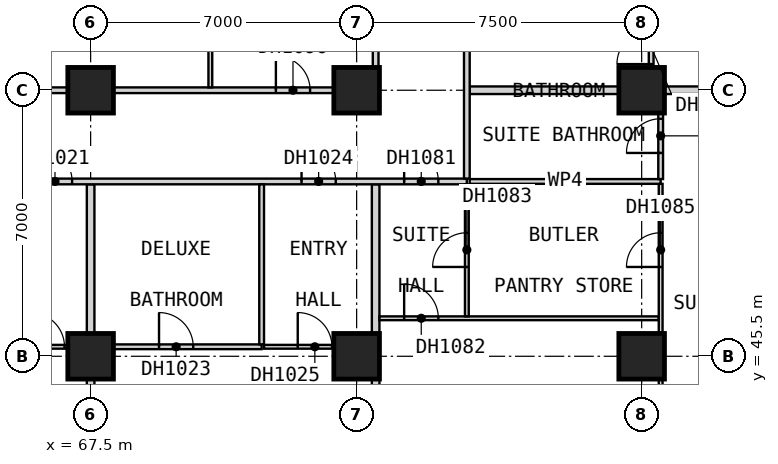
"""IFC4 building model, lengths in metres.
Left out: names, types, materials, properties, quantities, classifications, styles, units other than length and angle.
Written with IfcOpenShell. Run it as: python <this file> out.ifc"""

import sys

from ifc_helpers import new_model, si_unit, direction, frame, frame_2d, origin, origin_2d, place, context, subcontext, project, spatial, rectangle, extrude, element, fill, save


model = new_model("IFC4")
c1 = context("Model", 3, precision=1e-05, world=origin(), true_north=direction((0.0, 1.0)))
c2 = subcontext(c1, "Body", "Model", "MODEL_VIEW")
j1 = project(units=[si_unit("LENGTHUNIT", "METRE"), si_unit("PLANEANGLEUNIT", "RADIAN")], contexts=[c1])
p1 = place(None, origin())
s1 = spatial("IfcSite", under=j1, at=p1, CompositionType="ELEMENT")
p2 = place(p1, origin())
s2 = spatial("IfcBuilding", under=s1, at=p2, CompositionType="ELEMENT")
p3 = place(p2, frame((0.0, 0.0, 34.0)))
s3 = spatial("IfcBuildingStorey", under=s2, at=p3, CompositionType="ELEMENT", Elevation=34.0)
for number, where, z_axis, x_axis in (
    (1, (67.5, 45.5, 0.0), (0.0, 0.0, 1.0), (1.0, 0.0, 0.0)),
    (2, (67.5, 52.5, 0.0), (0.0, 0.0, 1.0), (1.0, 0.0, 0.0)),
    (3, (74.5, 45.5, 0.0), (0.0, 0.0, 1.0), (1.0, 0.0, 0.0)),
    (4, (74.5, 52.5, 0.0), (0.0, 0.0, 1.0), (1.0, 0.0, 0.0)),
    (5, (82.0, 45.5, 0.0), (0.0, 0.0, 1.0), (1.0, 0.0, 0.0)),
    (6, (82.0, 52.5, 0.0), (0.0, 0.0, 1.0), (1.0, 0.0, 0.0)),
):
    element("IfcColumn", number, at=place(p3, frame(where, z_axis=z_axis, x_axis=x_axis)), inside=s3, PredefinedType="COLUMN", context=c2, shape_type="SweptSolid", body=[
        extrude(rectangle(XDim=1.2, YDim=1.2, at=origin_2d()), origin(), (0.0, 0.0, 1.0), 3.6),
    ])
for number, where, z_axis, x_axis in (
    (7, (77.475, 52.5, 0.0), (0.0, 0.0, 1.0), (1.0, 0.0, 0.0)),
    (8, (67.5, 37.5, 0.0), (0.0, 0.0, 1.0), (0.0, 1.0, 0.0)),
):
    element("IfcWall", number, at=place(p3, frame(where, z_axis=z_axis, x_axis=x_axis)), inside=s3, PredefinedType="PARTITIONING", context=c2, shape_type="SweptSolid", body=[
        extrude(rectangle(XDim=12.525, YDim=0.2, at=frame_2d((6.262, 0.0))), origin(), (0.0, 0.0, 1.0), 3.35),
    ])
p4 = place(p3, frame((75.0, 38.31, 0.0), z_axis=(0.0, 0.0, 1.0), x_axis=(0.0, 1.0, 0.0)))
e9 = element("IfcWall", 9, at=p4, inside=s3, PredefinedType="PARTITIONING", context=c2, shape_type="SweptSolid", body=[
    extrude(rectangle(XDim=11.715, YDim=0.2, at=frame_2d((5.857, 0.0))), origin(), (0.0, 0.0, 1.0), 3.35),
])
p5 = place(p3, frame((33.75, 50.1, 0.0), z_axis=(0.0, 0.0, 1.0), x_axis=(1.0, 0.0, 0.0)))
e10 = element("IfcWall", 10, at=p5, inside=s3, PredefinedType="PARTITIONING", context=c2, shape_type="SweptSolid", body=[
    extrude(rectangle(XDim=43.65, YDim=0.15, at=frame_2d((21.825, 0.0))), origin(), (0.0, 0.0, 1.0), 3.35),
])
p6 = place(p5, frame((5.175, 0.0, 0.0)))
e11 = element("IfcOpeningElement", 11, at=p6, cuts=e10, PredefinedType="OPENING", context=c2, shape_type="SweptSolid", body=[
    extrude(rectangle(XDim=0.9, YDim=2.1, at=frame_2d((0.45, 1.05))), frame((0.0, 0.085, 0.0), z_axis=(0.0, -1.0, 0.0), x_axis=(1.0, 0.0, 0.0)), (0.0, 0.0, 1.0), 0.17),
])
p7 = place(p5, frame((13.05, 0.0, 0.0)))
e12 = element("IfcOpeningElement", 12, at=p7, cuts=e10, PredefinedType="OPENING", context=c2, shape_type="SweptSolid", body=[
    extrude(rectangle(XDim=0.9, YDim=2.1, at=frame_2d((0.45, 1.05))), frame((0.0, 0.085, 0.0), z_axis=(0.0, -1.0, 0.0), x_axis=(1.0, 0.0, 0.0)), (0.0, 0.0, 1.0), 0.17),
])
p8 = place(p5, frame((17.363, 0.0, 0.0)))
e13 = element("IfcOpeningElement", 13, at=p8, cuts=e10, PredefinedType="OPENING", context=c2, shape_type="SweptSolid", body=[
    extrude(rectangle(XDim=0.9, YDim=2.1, at=frame_2d((0.45, 1.05))), frame((0.0, 0.085, 0.0), z_axis=(0.0, -1.0, 0.0), x_axis=(1.0, 0.0, 0.0)), (0.0, 0.0, 1.0), 0.17),
])
p9 = place(p5, frame((21.113, 0.0, 0.0)))
e14 = element("IfcOpeningElement", 14, at=p9, cuts=e10, PredefinedType="OPENING", context=c2, shape_type="SweptSolid", body=[
    extrude(rectangle(XDim=0.9, YDim=2.1, at=frame_2d((0.45, 1.05))), frame((0.0, 0.085, 0.0), z_axis=(0.0, -1.0, 0.0), x_axis=(1.0, 0.0, 0.0)), (0.0, 0.0, 1.0), 0.17),
])
p10 = place(p5, frame((24.863, 0.0, 0.0)))
e15 = element("IfcOpeningElement", 15, at=p10, cuts=e10, PredefinedType="OPENING", context=c2, shape_type="SweptSolid", body=[
    extrude(rectangle(XDim=0.9, YDim=2.1, at=frame_2d((0.45, 1.05))), frame((0.0, 0.085, 0.0), z_axis=(0.0, -1.0, 0.0), x_axis=(1.0, 0.0, 0.0)), (0.0, 0.0, 1.0), 0.17),
])
p11 = place(p5, frame((28.613, 0.0, 0.0)))
e16 = element("IfcOpeningElement", 16, at=p11, cuts=e10, PredefinedType="OPENING", context=c2, shape_type="SweptSolid", body=[
    extrude(rectangle(XDim=0.9, YDim=2.1, at=frame_2d((0.45, 1.05))), frame((0.0, 0.085, 0.0), z_axis=(0.0, -1.0, 0.0), x_axis=(1.0, 0.0, 0.0)), (0.0, 0.0, 1.0), 0.17),
])
p12 = place(p5, frame((32.363, 0.0, 0.0)))
e17 = element("IfcOpeningElement", 17, at=p12, cuts=e10, PredefinedType="OPENING", context=c2, shape_type="SweptSolid", body=[
    extrude(rectangle(XDim=0.9, YDim=2.1, at=frame_2d((0.45, 1.05))), frame((0.0, 0.085, 0.0), z_axis=(0.0, -1.0, 0.0), x_axis=(1.0, 0.0, 0.0)), (0.0, 0.0, 1.0), 0.17),
])
p13 = place(p5, frame((39.3, 0.0, 0.0)))
e18 = element("IfcOpeningElement", 18, at=p13, cuts=e10, PredefinedType="OPENING", context=c2, shape_type="SweptSolid", body=[
    extrude(rectangle(XDim=0.9, YDim=2.1, at=frame_2d((0.45, 1.05))), frame((0.0, 0.085, 0.0), z_axis=(0.0, -1.0, 0.0), x_axis=(1.0, 0.0, 0.0)), (0.0, 0.0, 1.0), 0.17),
])
p14 = place(p5, frame((42.0, 0.0, 0.0)))
e19 = element("IfcOpeningElement", 19, at=p14, cuts=e10, PredefinedType="OPENING", context=c2, shape_type="SweptSolid", body=[
    extrude(rectangle(XDim=0.9, YDim=2.1, at=frame_2d((0.45, 1.05))), frame((0.0, 0.085, 0.0), z_axis=(0.0, -1.0, 0.0), x_axis=(1.0, 0.0, 0.0)), (0.0, 0.0, 1.0), 0.17),
])
p15 = place(p3, frame((60.0, 52.5, 0.0), z_axis=(0.0, 0.0, 1.0), x_axis=(1.0, 0.0, 0.0)))
e20 = element("IfcWall", 20, at=p15, inside=s3, PredefinedType="PARTITIONING", context=c2, shape_type="SweptSolid", body=[
    extrude(rectangle(XDim=15.0, YDim=0.15, at=frame_2d((7.5, 0.0))), origin(), (0.0, 0.0, 1.0), 3.35),
])
p16 = place(p15, frame((4.875, 0.0, 0.0)))
e21 = element("IfcOpeningElement", 21, at=p16, cuts=e20, PredefinedType="OPENING", context=c2, shape_type="SweptSolid", body=[
    extrude(rectangle(XDim=0.9, YDim=2.1, at=frame_2d((0.45, 1.05))), frame((0.0, 0.085, 0.0), z_axis=(0.0, -1.0, 0.0), x_axis=(1.0, 0.0, 0.0)), (0.0, 0.0, 1.0), 0.17),
])
p17 = place(p15, frame((12.375, 0.0, 0.0)))
e22 = element("IfcOpeningElement", 22, at=p17, cuts=e20, PredefinedType="OPENING", context=c2, shape_type="SweptSolid", body=[
    extrude(rectangle(XDim=0.9, YDim=2.1, at=frame_2d((0.45, 1.05))), frame((0.0, 0.085, 0.0), z_axis=(0.0, -1.0, 0.0), x_axis=(1.0, 0.0, 0.0)), (0.0, 0.0, 1.0), 0.17),
])
p18 = place(p3, frame((75.0, 52.575, 0.0), z_axis=(0.0, 0.0, 1.0), x_axis=(0.0, 1.0, 0.0)))
e23 = element("IfcWall", 23, at=p18, inside=s3, PredefinedType="PARTITIONING", context=c2, shape_type="SweptSolid", body=[
    extrude(rectangle(XDim=11.85, YDim=0.15, at=frame_2d((5.925, 0.0))), origin(), (0.0, 0.0, 1.0), 3.35),
])
p19 = place(p18, frame((9.225, 0.0, 0.0)))
e24 = element("IfcOpeningElement", 24, at=p19, cuts=e23, PredefinedType="OPENING", context=c2, shape_type="SweptSolid", body=[
    extrude(rectangle(XDim=0.9, YDim=2.1, at=frame_2d((0.45, 1.05))), frame((0.0, 0.085, 0.0), z_axis=(0.0, -1.0, 0.0), x_axis=(1.0, 0.0, 0.0)), (0.0, 0.0, 1.0), 0.17),
])
p20 = place(p3, frame((77.4, 50.175, 0.0), z_axis=(0.0, 0.0, 1.0), x_axis=(0.0, 1.0, 0.0)))
e25 = element("IfcWall", 25, at=p20, inside=s3, PredefinedType="PARTITIONING", context=c2, shape_type="SweptSolid", body=[
    extrude(rectangle(XDim=42.15, YDim=0.15, at=frame_2d((21.075, 0.0))), origin(), (0.0, 0.0, 1.0), 3.35),
])
p21 = place(p20, frame((4.688, 0.0, 0.0)))
e26 = element("IfcOpeningElement", 26, at=p21, cuts=e25, PredefinedType="OPENING", context=c2, shape_type="SweptSolid", body=[
    extrude(rectangle(XDim=0.9, YDim=2.1, at=frame_2d((0.45, 1.05))), frame((0.0, 0.085, 0.0), z_axis=(0.0, -1.0, 0.0), x_axis=(1.0, 0.0, 0.0)), (0.0, 0.0, 1.0), 0.17),
])
p22 = place(p20, frame((8.438, 0.0, 0.0)))
e27 = element("IfcOpeningElement", 27, at=p22, cuts=e25, PredefinedType="OPENING", context=c2, shape_type="SweptSolid", body=[
    extrude(rectangle(XDim=0.9, YDim=2.1, at=frame_2d((0.45, 1.05))), frame((0.0, 0.085, 0.0), z_axis=(0.0, -1.0, 0.0), x_axis=(1.0, 0.0, 0.0)), (0.0, 0.0, 1.0), 0.17),
])
p23 = place(p20, frame((12.188, 0.0, 0.0)))
e28 = element("IfcOpeningElement", 28, at=p23, cuts=e25, PredefinedType="OPENING", context=c2, shape_type="SweptSolid", body=[
    extrude(rectangle(XDim=0.9, YDim=2.1, at=frame_2d((0.45, 1.05))), frame((0.0, 0.085, 0.0), z_axis=(0.0, -1.0, 0.0), x_axis=(1.0, 0.0, 0.0)), (0.0, 0.0, 1.0), 0.17),
])
p24 = place(p20, frame((15.938, 0.0, 0.0)))
e29 = element("IfcOpeningElement", 29, at=p24, cuts=e25, PredefinedType="OPENING", context=c2, shape_type="SweptSolid", body=[
    extrude(rectangle(XDim=0.9, YDim=2.1, at=frame_2d((0.45, 1.05))), frame((0.0, 0.085, 0.0), z_axis=(0.0, -1.0, 0.0), x_axis=(1.0, 0.0, 0.0)), (0.0, 0.0, 1.0), 0.17),
])
p25 = place(p20, frame((19.688, 0.0, 0.0)))
e30 = element("IfcOpeningElement", 30, at=p25, cuts=e25, PredefinedType="OPENING", context=c2, shape_type="SweptSolid", body=[
    extrude(rectangle(XDim=0.9, YDim=2.1, at=frame_2d((0.45, 1.05))), frame((0.0, 0.085, 0.0), z_axis=(0.0, -1.0, 0.0), x_axis=(1.0, 0.0, 0.0)), (0.0, 0.0, 1.0), 0.17),
])
p26 = place(p20, frame((23.438, 0.0, 0.0)))
e31 = element("IfcOpeningElement", 31, at=p26, cuts=e25, PredefinedType="OPENING", context=c2, shape_type="SweptSolid", body=[
    extrude(rectangle(XDim=0.9, YDim=2.1, at=frame_2d((0.45, 1.05))), frame((0.0, 0.085, 0.0), z_axis=(0.0, -1.0, 0.0), x_axis=(1.0, 0.0, 0.0)), (0.0, 0.0, 1.0), 0.17),
])
p27 = place(p20, frame((27.188, 0.0, 0.0)))
e32 = element("IfcOpeningElement", 32, at=p27, cuts=e25, PredefinedType="OPENING", context=c2, shape_type="SweptSolid", body=[
    extrude(rectangle(XDim=0.9, YDim=2.1, at=frame_2d((0.45, 1.05))), frame((0.0, 0.085, 0.0), z_axis=(0.0, -1.0, 0.0), x_axis=(1.0, 0.0, 0.0)), (0.0, 0.0, 1.0), 0.17),
])
p28 = place(p20, frame((30.938, 0.0, 0.0)))
e33 = element("IfcOpeningElement", 33, at=p28, cuts=e25, PredefinedType="OPENING", context=c2, shape_type="SweptSolid", body=[
    extrude(rectangle(XDim=0.9, YDim=2.1, at=frame_2d((0.45, 1.05))), frame((0.0, 0.085, 0.0), z_axis=(0.0, -1.0, 0.0), x_axis=(1.0, 0.0, 0.0)), (0.0, 0.0, 1.0), 0.17),
])
p29 = place(p20, frame((34.688, 0.0, 0.0)))
e34 = element("IfcOpeningElement", 34, at=p29, cuts=e25, PredefinedType="OPENING", context=c2, shape_type="SweptSolid", body=[
    extrude(rectangle(XDim=0.9, YDim=2.1, at=frame_2d((0.45, 1.05))), frame((0.0, 0.085, 0.0), z_axis=(0.0, -1.0, 0.0), x_axis=(1.0, 0.0, 0.0)), (0.0, 0.0, 1.0), 0.17),
])
p30 = place(p20, frame((38.438, 0.0, 0.0)))
e35 = element("IfcOpeningElement", 35, at=p30, cuts=e25, PredefinedType="OPENING", context=c2, shape_type="SweptSolid", body=[
    extrude(rectangle(XDim=0.9, YDim=2.1, at=frame_2d((0.45, 1.05))), frame((0.0, 0.085, 0.0), z_axis=(0.0, -1.0, 0.0), x_axis=(1.0, 0.0, 0.0)), (0.0, 0.0, 1.0), 0.17),
])
p31 = place(p3, frame((65.688, 45.75, 0.0), z_axis=(0.0, 0.0, 1.0), x_axis=(1.0, 0.0, 0.0)))
e36 = element("IfcWall", 36, at=p31, inside=s3, PredefinedType="PARTITIONING", context=c2, shape_type="SweptSolid", body=[
    extrude(rectangle(XDim=1.712, YDim=0.1, at=frame_2d((0.856, 0.0))), origin(), (0.0, 0.0, 1.0), 3.35),
])
p32 = place(p31, frame((0.225, 0.0, 0.0)))
e37 = element("IfcOpeningElement", 37, at=p32, cuts=e36, PredefinedType="OPENING", context=c2, shape_type="SweptSolid", body=[
    extrude(rectangle(XDim=0.9, YDim=2.1, at=frame_2d((0.45, 1.05))), frame((0.0, 0.06, 0.0), z_axis=(0.0, -1.0, 0.0), x_axis=(1.0, 0.0, 0.0)), (0.0, 0.0, 1.0), 0.12),
])
p33 = place(p3, frame((72.062, 45.75, 0.0), z_axis=(0.0, 0.0, 1.0), x_axis=(1.0, 0.0, 0.0)))
e38 = element("IfcWall", 38, at=p33, inside=s3, PredefinedType="PARTITIONING", context=c2, shape_type="SweptSolid", body=[
    extrude(rectangle(XDim=2.837, YDim=0.1, at=frame_2d((1.419, 0.0))), origin(), (0.0, 0.0, 1.0), 3.35),
])
p34 = place(p33, frame((0.887, 0.0, 0.0)))
e39 = element("IfcOpeningElement", 39, at=p34, cuts=e38, PredefinedType="OPENING", context=c2, shape_type="SweptSolid", body=[
    extrude(rectangle(XDim=0.9, YDim=2.1, at=frame_2d((0.45, 1.05))), frame((0.0, 0.06, 0.0), z_axis=(0.0, -1.0, 0.0), x_axis=(1.0, 0.0, 0.0)), (0.0, 0.0, 1.0), 0.12),
])
p35 = place(p3, frame((75.1, 46.5, 0.0), z_axis=(0.0, 0.0, 1.0), x_axis=(1.0, 0.0, 0.0)))
e40 = element("IfcWall", 40, at=p35, inside=s3, PredefinedType="PARTITIONING", context=c2, shape_type="SweptSolid", body=[
    extrude(rectangle(XDim=7.35, YDim=0.1, at=frame_2d((3.675, 0.0))), origin(), (0.0, 0.0, 1.0), 3.35),
])
p36 = place(p35, frame((0.65, 0.0, 0.0)))
e41 = element("IfcOpeningElement", 41, at=p36, cuts=e40, PredefinedType="OPENING", context=c2, shape_type="SweptSolid", body=[
    extrude(rectangle(XDim=0.9, YDim=2.1, at=frame_2d((0.45, 1.05))), frame((0.0, 0.06, 0.0), z_axis=(0.0, -1.0, 0.0), x_axis=(1.0, 0.0, 0.0)), (0.0, 0.0, 1.0), 0.12),
])
p37 = place(p3, frame((70.65, 52.575, 0.0), z_axis=(0.0, 0.0, 1.0), x_axis=(0.0, 1.0, 0.0)))
e42 = element("IfcWall", 42, at=p37, inside=s3, PredefinedType="PARTITIONING", context=c2, shape_type="SweptSolid", body=[
    extrude(rectangle(XDim=7.375, YDim=0.1, at=frame_2d((3.688, 0.0))), origin(), (0.0, 0.0, 1.0), 3.35),
])
p38 = place(p3, frame((77.4, 46.55, 0.0), z_axis=(0.0, 0.0, 1.0), x_axis=(0.0, 1.0, 0.0)))
e43 = element("IfcWall", 43, at=p38, inside=s3, PredefinedType="PARTITIONING", context=c2, shape_type="SweptSolid", body=[
    extrude(rectangle(XDim=3.475, YDim=0.1, at=frame_2d((1.737, 0.0))), origin(), (0.0, 0.0, 1.0), 3.35),
])
p39 = place(p38, frame((1.3, 0.0, 0.0)))
e44 = element("IfcOpeningElement", 44, at=p39, cuts=e43, PredefinedType="OPENING", context=c2, shape_type="SweptSolid", body=[
    extrude(rectangle(XDim=0.9, YDim=2.1, at=frame_2d((0.45, 1.05))), frame((0.0, 0.06, 0.0), z_axis=(0.0, -1.0, 0.0), x_axis=(1.0, 0.0, 0.0)), (0.0, 0.0, 1.0), 0.12),
])
p40 = place(p3, frame((82.5, 38.31, 0.0), z_axis=(0.0, 0.0, 1.0), x_axis=(0.0, 1.0, 0.0)))
e45 = element("IfcWall", 45, at=p40, inside=s3, PredefinedType="PARTITIONING", context=c2, shape_type="SweptSolid", body=[
    extrude(rectangle(XDim=11.728, YDim=0.1, at=frame_2d((5.864, 0.0))), origin(), (0.0, 0.0, 1.0), 3.35),
])
p41 = place(p40, frame((0.615, 0.0, 0.0)))
e46 = element("IfcOpeningElement", 46, at=p41, cuts=e45, PredefinedType="OPENING", context=c2, shape_type="SweptSolid", body=[
    extrude(rectangle(XDim=0.9, YDim=2.1, at=frame_2d((0.45, 1.05))), frame((0.0, 0.06, 0.0), z_axis=(0.0, -1.0, 0.0), x_axis=(1.0, 0.0, 0.0)), (0.0, 0.0, 1.0), 0.12),
])
p42 = place(p40, frame((9.54, 0.0, 0.0)))
e47 = element("IfcOpeningElement", 47, at=p42, cuts=e45, PredefinedType="OPENING", context=c2, shape_type="SweptSolid", body=[
    extrude(rectangle(XDim=0.9, YDim=2.1, at=frame_2d((0.45, 1.05))), frame((0.0, 0.06, 0.0), z_axis=(0.0, -1.0, 0.0), x_axis=(1.0, 0.0, 0.0)), (0.0, 0.0, 1.0), 0.12),
])
p43 = place(p3, frame((67.6, 45.75, 0.0), z_axis=(0.0, 0.0, 1.0), x_axis=(1.0, 0.0, 0.0)))
e48 = element("IfcWall", 48, at=p43, inside=s3, PredefinedType="PARTITIONING", context=c2, shape_type="SweptSolid", body=[
    extrude(rectangle(XDim=4.4, YDim=0.125, at=frame_2d((2.2, 0.0))), origin(), (0.0, 0.0, 1.0), 3.35),
])
p44 = place(p43, frame((1.7, 0.0, 0.0)))
e49 = element("IfcOpeningElement", 49, at=p44, cuts=e48, PredefinedType="OPENING", context=c2, shape_type="SweptSolid", body=[
    extrude(rectangle(XDim=0.9, YDim=2.1, at=frame_2d((0.45, 1.05))), frame((0.0, 0.073, 0.0), z_axis=(0.0, -1.0, 0.0), x_axis=(1.0, 0.0, 0.0)), (0.0, 0.0, 1.0), 0.145),
])
p45 = place(p3, frame((77.475, 50.1, 0.0), z_axis=(0.0, 0.0, 1.0), x_axis=(1.0, 0.0, 0.0)))
e50 = element("IfcWall", 50, at=p45, inside=s3, PredefinedType="PARTITIONING", context=c2, shape_type="SweptSolid", body=[
    extrude(rectangle(XDim=5.025, YDim=0.125, at=frame_2d((2.512, 0.0))), origin(), (0.0, 0.0, 1.0), 3.35),
])
p46 = place(p3, frame((72.0, 45.812, 0.0), z_axis=(0.0, 0.0, 1.0), x_axis=(0.0, 1.0, 0.0)))
e51 = element("IfcWall", 51, at=p46, inside=s3, PredefinedType="PARTITIONING", context=c2, shape_type="SweptSolid", body=[
    extrude(rectangle(XDim=4.212, YDim=0.125, at=frame_2d((2.106, 0.0))), origin(), (0.0, 0.0, 1.0), 3.35),
])
p47 = place(p3, frame((82.25, 52.6, 0.0), z_axis=(0.0, 0.0, 1.0), x_axis=(0.0, 1.0, 0.0)))
e52 = element("IfcWall", 52, at=p47, inside=s3, PredefinedType="PARTITIONING", context=c2, shape_type="SweptSolid", body=[
    extrude(rectangle(XDim=1.712, YDim=0.125, at=frame_2d((0.856, 0.0))), origin(), (0.0, 0.0, 1.0), 3.35),
])
p48 = place(p47, frame((0.587, 0.0, 0.0)))
e53 = element("IfcOpeningElement", 53, at=p48, cuts=e52, PredefinedType="OPENING", context=c2, shape_type="SweptSolid", body=[
    extrude(rectangle(XDim=0.9, YDim=2.1, at=frame_2d((0.45, 1.05))), frame((0.0, 0.073, 0.0), z_axis=(0.0, -1.0, 0.0), x_axis=(1.0, 0.0, 0.0)), (0.0, 0.0, 1.0), 0.145),
])
p49 = place(p3, frame((82.5, 50.163, 0.0), z_axis=(0.0, 0.0, 1.0), x_axis=(0.0, 1.0, 0.0)))
e54 = element("IfcWall", 54, at=p49, inside=s3, PredefinedType="PARTITIONING", context=c2, shape_type="SweptSolid", body=[
    extrude(rectangle(XDim=2.237, YDim=0.125, at=frame_2d((1.119, 0.0))), origin(), (0.0, 0.0, 1.0), 3.35),
])
p50 = place(p49, frame((0.688, 0.0, 0.0)))
e55 = element("IfcOpeningElement", 55, at=p50, cuts=e54, PredefinedType="OPENING", context=c2, shape_type="SweptSolid", body=[
    extrude(rectangle(XDim=0.9, YDim=2.1, at=frame_2d((0.45, 1.05))), frame((0.0, 0.073, 0.0), z_axis=(0.0, -1.0, 0.0), x_axis=(1.0, 0.0, 0.0)), (0.0, 0.0, 1.0), 0.145),
])
p51 = place(p12, origin())
e56 = element("IfcDoor", 56, at=p51, inside=s3, OperationType="SINGLE_SWING_RIGHT", PredefinedType="DOOR", context=c2, shape_type="SweptSolid", body=[
    extrude(rectangle(XDim=0.9, YDim=2.1, at=frame_2d((0.45, 1.05))), frame((0.0, 0.025, 0.0), z_axis=(0.0, -1.0, 0.0), x_axis=(1.0, 0.0, 0.0)), (0.0, 0.0, 1.0), 0.05),
])
fill(e17, e56)
p52 = place(p32, origin())
e57 = element("IfcDoor", 57, at=p52, inside=s3, OperationType="SINGLE_SWING_LEFT", PredefinedType="DOOR", context=c2, shape_type="SweptSolid", body=[
    extrude(rectangle(XDim=0.9, YDim=2.1, at=frame_2d((0.45, 1.05))), frame((0.0, 0.025, 0.0), z_axis=(0.0, -1.0, 0.0), x_axis=(1.0, 0.0, 0.0)), (0.0, 0.0, 1.0), 0.05),
])
fill(e37, e57)
p53 = place(p44, origin())
e58 = element("IfcDoor", 58, at=p53, inside=s3, OperationType="SINGLE_SWING_LEFT", PredefinedType="DOOR", context=c2, shape_type="SweptSolid", body=[
    extrude(rectangle(XDim=0.9, YDim=2.1, at=frame_2d((0.45, 1.05))), frame((0.0, 0.025, 0.0), z_axis=(0.0, -1.0, 0.0), x_axis=(1.0, 0.0, 0.0)), (0.0, 0.0, 1.0), 0.05),
])
fill(e49, e58)
p54 = place(p13, origin())
e59 = element("IfcDoor", 59, at=p54, inside=s3, OperationType="SINGLE_SWING_RIGHT", PredefinedType="DOOR", context=c2, shape_type="SweptSolid", body=[
    extrude(rectangle(XDim=0.9, YDim=2.1, at=frame_2d((0.45, 1.05))), frame((0.0, 0.025, 0.0), z_axis=(0.0, -1.0, 0.0), x_axis=(1.0, 0.0, 0.0)), (0.0, 0.0, 1.0), 0.05),
])
fill(e18, e59)
p55 = place(p34, origin())
e60 = element("IfcDoor", 60, at=p55, inside=s3, OperationType="SINGLE_SWING_LEFT", PredefinedType="DOOR", context=c2, shape_type="SweptSolid", body=[
    extrude(rectangle(XDim=0.9, YDim=2.1, at=frame_2d((0.45, 1.05))), frame((0.0, 0.025, 0.0), z_axis=(0.0, -1.0, 0.0), x_axis=(1.0, 0.0, 0.0)), (0.0, 0.0, 1.0), 0.05),
])
fill(e39, e60)
p56 = place(p48, origin())
e61 = element("IfcDoor", 61, at=p56, inside=s3, OperationType="SINGLE_SWING_RIGHT", PredefinedType="DOOR", context=c2, shape_type="SweptSolid", body=[
    extrude(rectangle(XDim=0.9, YDim=2.1, at=frame_2d((0.45, 1.05))), frame((0.0, 0.025, 0.0), z_axis=(0.0, -1.0, 0.0), x_axis=(1.0, 0.0, 0.0)), (0.0, 0.0, 1.0), 0.05),
])
fill(e53, e61)
p57 = place(p14, origin())
e62 = element("IfcDoor", 62, at=p57, inside=s3, OperationType="SINGLE_SWING_LEFT", PredefinedType="DOOR", context=c2, shape_type="SweptSolid", body=[
    extrude(rectangle(XDim=0.9, YDim=2.1, at=frame_2d((0.45, 1.05))), frame((0.0, 0.025, 0.0), z_axis=(0.0, -1.0, 0.0), x_axis=(1.0, 0.0, 0.0)), (0.0, 0.0, 1.0), 0.05),
])
fill(e19, e62)
p58 = place(p36, origin())
e63 = element("IfcDoor", 63, at=p58, inside=s3, OperationType="SINGLE_SWING_RIGHT", PredefinedType="DOOR", context=c2, shape_type="SweptSolid", body=[
    extrude(rectangle(XDim=0.9, YDim=2.1, at=frame_2d((0.45, 1.05))), frame((0.0, 0.025, 0.0), z_axis=(0.0, -1.0, 0.0), x_axis=(1.0, 0.0, 0.0)), (0.0, 0.0, 1.0), 0.05),
])
fill(e41, e63)
p59 = place(p39, origin())
e64 = element("IfcDoor", 64, at=p59, inside=s3, OperationType="SINGLE_SWING_RIGHT", PredefinedType="DOOR", context=c2, shape_type="SweptSolid", body=[
    extrude(rectangle(XDim=0.9, YDim=2.1, at=frame_2d((0.45, 1.05))), frame((0.0, 0.025, 0.0), z_axis=(0.0, -1.0, 0.0), x_axis=(1.0, 0.0, 0.0)), (0.0, 0.0, 1.0), 0.05),
])
fill(e44, e64)
p60 = place(p42, origin())
e65 = element("IfcDoor", 65, at=p60, inside=s3, OperationType="SINGLE_SWING_RIGHT", PredefinedType="DOOR", context=c2, shape_type="SweptSolid", body=[
    extrude(rectangle(XDim=0.9, YDim=2.1, at=frame_2d((0.45, 1.05))), frame((0.0, 0.025, 0.0), z_axis=(0.0, -1.0, 0.0), x_axis=(1.0, 0.0, 0.0)), (0.0, 0.0, 1.0), 0.05),
])
fill(e47, e65)
p61 = place(p50, origin())
e66 = element("IfcDoor", 66, at=p61, inside=s3, OperationType="SINGLE_SWING_LEFT", PredefinedType="DOOR", context=c2, shape_type="SweptSolid", body=[
    extrude(rectangle(XDim=0.9, YDim=2.1, at=frame_2d((0.45, 1.05))), frame((0.0, 0.025, 0.0), z_axis=(0.0, -1.0, 0.0), x_axis=(1.0, 0.0, 0.0)), (0.0, 0.0, 1.0), 0.05),
])
fill(e55, e66)
p62 = place(p17, origin())
e67 = element("IfcDoor", 67, at=p62, inside=s3, OperationType="SINGLE_SWING_RIGHT", PredefinedType="DOOR", context=c2, shape_type="SweptSolid", body=[
    extrude(rectangle(XDim=0.9, YDim=2.1, at=frame_2d((0.45, 1.05))), frame((0.0, 0.025, 0.0), z_axis=(0.0, -1.0, 0.0), x_axis=(1.0, 0.0, 0.0)), (0.0, 0.0, 1.0), 0.05),
])
fill(e22, e67)
save(model, sys.argv[1])
